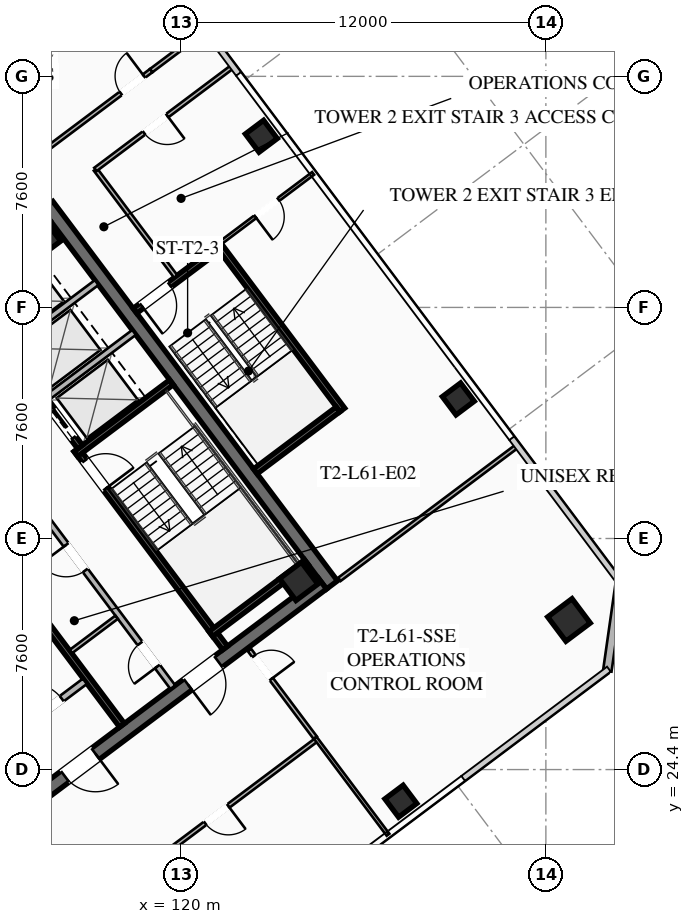
"""IFC4 building model, lengths in metres.
Left out: names, types, materials, properties, quantities, classifications, styles, units other than length and angle.
Written with IfcOpenShell. Run it as: python <this file> out.ifc"""

import sys

from ifc_helpers import new_model, si_unit, direction, frame, frame_2d, origin, origin_2d, place, context, subcontext, project, spatial, rectangle, hollow_rectangle, extrude, element, fill, save


model = new_model("IFC4")
c1 = context("Model", 3, precision=1e-05, world=origin(), true_north=direction((0.0, 1.0)))
c2 = subcontext(c1, "Body", "Model", "MODEL_VIEW")
j1 = project(units=[si_unit("LENGTHUNIT", "METRE"), si_unit("PLANEANGLEUNIT", "RADIAN")], contexts=[c1])
p1 = place(None, origin())
s1 = spatial("IfcSite", under=j1, at=p1, CompositionType="ELEMENT")
p2 = place(p1, origin())
s2 = spatial("IfcBuilding", under=s1, at=p2, CompositionType="ELEMENT")
p3 = place(p2, frame((0.0, 0.0, 225.5)))
s3 = spatial("IfcBuildingStorey", under=s2, at=p3, CompositionType="ELEMENT", Elevation=225.5)
p4 = place(p3, frame((115.604, 42.953, 0.0), z_axis=(0.0, 0.0, 1.0), x_axis=(0.600005007985, -0.799996243986, 0.0)))
e1 = element("IfcWall", 1, at=p4, inside=s3, PredefinedType="SHEAR", context=c2, shape_type="SweptSolid", body=[
    extrude(rectangle(XDim=15.6, YDim=0.45, at=frame_2d((7.8, 0.0))), origin(), (0.0, 0.0, 1.0), 3.55),
])
p5 = place(p3, frame((124.649, 30.518, 0.0), z_axis=(0.0, 0.0, 1.0), x_axis=(-0.8, -0.6, 0.0)))
e2 = element("IfcWall", 2, at=p5, inside=s3, PredefinedType="SHEAR", context=c2, shape_type="SweptSolid", body=[
    extrude(rectangle(XDim=15.26, YDim=0.45, at=frame_2d((7.63, 0.0))), origin(), (0.0, 0.0, 1.0), 3.55),
])
p6 = place(p5, frame((9.33, 0.0, 0.0)))
e3 = element("IfcOpeningElement", 3, at=p6, cuts=e2, PredefinedType="OPENING", context=c2, shape_type="SweptSolid", body=[
    extrude(rectangle(XDim=1.25, YDim=2.25, at=frame_2d((0.625, 1.125))), frame((0.0, 0.235, 0.0), z_axis=(0.0, -1.0, 0.0), x_axis=(1.0, 0.0, 0.0)), (0.0, 0.0, 1.0), 0.47),
])
p7 = place(p5, frame((4.28, 0.0, 0.0)))
e4 = element("IfcOpeningElement", 4, at=p7, cuts=e2, PredefinedType="OPENING", context=c2, shape_type="SweptSolid", body=[
    extrude(rectangle(XDim=1.25, YDim=2.25, at=frame_2d((0.625, 1.125))), frame((0.0, 0.235, 0.0), z_axis=(0.0, -1.0, 0.0), x_axis=(1.0, 0.0, 0.0)), (0.0, 0.0, 1.0), 0.47),
])
for number, where, z_axis, x_axis in (
    (5, (123.87, 30.59, 0.0), (0.0, 0.0, 1.0), (0.8, 0.6, 0.0)),
    (6, (115.41, 41.87, 0.0), (0.0, 0.0, 1.0), (0.8, 0.6, 0.0)),
):
    element("IfcColumn", number, at=place(p3, frame(where, z_axis=z_axis, x_axis=x_axis)), inside=s3, PredefinedType="COLUMN", context=c2, shape_type="SweptSolid", body=[
        extrude(hollow_rectangle(XDim=0.9, YDim=0.9, WallThickness=0.04, at=origin_2d()), origin(), (0.0, 0.0, 1.0), 3.37),
    ])
p8 = place(p3, frame((132.76, 29.32, 0.0), z_axis=(0.0, 0.0, 1.0), x_axis=(0.799999996291, 0.600000004945, 0.0)))
e7 = element("IfcColumn", 7, at=p8, inside=s3, PredefinedType="COLUMN", context=c2, shape_type="SweptSolid", body=[
    extrude(hollow_rectangle(XDim=1.0, YDim=1.0, WallThickness=0.04, at=origin_2d()), origin(), (0.0, 0.0, 1.0), 3.37),
])
for number, where, z_axis, x_axis in (
    (8, (127.23, 23.36, 0.0), (0.0, 0.0, 1.0), (0.8, 0.6, 0.0)),
    (9, (129.12, 36.59, 0.0), (0.0, 0.0, 1.0), (0.8, 0.6, 0.0)),
    (10, (122.64, 45.23, 0.0), (0.0, 0.0, 1.0), (0.8, 0.6, 0.0)),
):
    element("IfcColumn", number, at=place(p3, frame(where, z_axis=z_axis, x_axis=x_axis)), inside=s3, PredefinedType="COLUMN", context=c2, shape_type="SweptSolid", body=[
        extrude(hollow_rectangle(XDim=0.75, YDim=0.75, WallThickness=0.032, at=origin_2d()), origin(), (0.0, 0.0, 1.0), 3.37),
    ])
p9 = place(p3, frame((134.44, 30.58, 0.0), z_axis=(0.0, 0.0, 1.0), x_axis=(-0.14138683146, -0.989954425158, 0.0)))
e11 = element("IfcWall", 11, at=p9, inside=s3, PredefinedType="SOLIDWALL", context=c2, shape_type="SweptSolid", body=[
    extrude(rectangle(XDim=2.97, YDim=0.28, at=frame_2d((1.485, 0.0))), origin(), (0.0, 0.0, 1.0), 3.37),
])
p10 = place(p3, frame((116.56, 34.92, 0.0), z_axis=(0.0, 0.0, 1.0), x_axis=(0.59999041401, -0.800007189403, 0.0)))
e12 = element("IfcWall", 12, at=p10, inside=s3, PredefinedType="SHEAR", context=c2, shape_type="SweptSolid", body=[
    extrude(rectangle(XDim=8.15, YDim=0.2, at=frame_2d((4.075, 0.0))), origin(), (0.0, 0.0, 1.0), 3.37),
])
p11 = place(p10, frame((0.45, 0.0, 0.0)))
e13 = element("IfcOpeningElement", 13, at=p11, cuts=e12, PredefinedType="OPENING", context=c2, shape_type="SweptSolid", body=[
    extrude(rectangle(XDim=1.15, YDim=2.2, at=frame_2d((0.575, 1.1))), frame((0.0, 0.11, 0.0), z_axis=(0.0, -1.0, 0.0), x_axis=(1.0, 0.0, 0.0)), (0.0, 0.0, 1.0), 0.22),
])
for number, where, z_axis, x_axis in (
    (14, (116.54, 34.78, 0.0), (0.0, 0.0, 1.0), (0.8, 0.6, 0.0)),
    (15, (120.98, 28.86, 0.0), (0.0, 0.0, 1.0), (0.8, 0.6, 0.0)),
):
    element("IfcWall", number, at=place(p3, frame(where, z_axis=z_axis, x_axis=x_axis)), inside=s3, PredefinedType="SHEAR", context=c2, shape_type="SweptSolid", body=[
        extrude(rectangle(XDim=3.93, YDim=0.2, at=frame_2d((1.965, 0.0))), origin(), (0.0, 0.0, 1.0), 3.37),
    ])
p12 = place(p3, frame((118.058, 25.856, 0.0), z_axis=(0.0, 0.0, 1.0), x_axis=(-0.600002657301, 0.799998007018, 0.0)))
e16 = element("IfcWall", 16, at=p12, inside=s3, PredefinedType="SHEAR", context=c2, shape_type="SweptSolid", body=[
    extrude(rectangle(XDim=14.7, YDim=0.2, at=frame_2d((7.35, 0.0))), origin(), (0.0, 0.0, 1.0), 3.37),
])
p13 = place(p3, frame((114.316, 25.412, 0.0), z_axis=(0.0, 0.0, 1.0), x_axis=(0.800018601094, 0.59997519774, 0.0)))
e17 = element("IfcWall", 17, at=p13, inside=s3, PredefinedType="SOLIDWALL", context=c2, shape_type="SweptSolid", body=[
    extrude(rectangle(XDim=3.15, YDim=0.22, at=frame_2d((1.575, 0.0))), origin(), (0.0, 0.0, 1.0), 2.723),
])
p14 = place(p13, frame((0.95, 0.0, 0.0)))
e18 = element("IfcOpeningElement", 18, at=p14, cuts=e17, PredefinedType="OPENING", context=c2, shape_type="SweptSolid", body=[
    extrude(rectangle(XDim=1.25, YDim=2.25, at=frame_2d((0.625, 1.125))), frame((0.0, 0.12, 0.0), z_axis=(0.0, -1.0, 0.0), x_axis=(1.0, 0.0, 0.0)), (0.0, 0.0, 1.0), 0.24),
])
p15 = place(p3, frame((112.75, 40.25, 0.0), z_axis=(0.0, 0.0, 1.0), x_axis=(0.599994036198, -0.800004472816, 0.0)))
e19 = element("IfcWall", 19, at=p15, inside=s3, PredefinedType="SHEAR", context=c2, shape_type="SweptSolid", body=[
    extrude(rectangle(XDim=6.55, YDim=0.2, at=frame_2d((3.275, 0.0))), origin(), (0.0, 0.0, 1.0), 3.37),
])
p16 = place(p15, frame((5.075, 0.0, 0.0)))
e20 = element("IfcOpeningElement", 20, at=p16, cuts=e19, PredefinedType="OPENING", context=c2, shape_type="SweptSolid", body=[
    extrude(rectangle(XDim=1.1, YDim=2.2, at=frame_2d((0.55, 1.1))), frame((0.0, 0.11, 0.0), z_axis=(0.0, -1.0, 0.0), x_axis=(1.0, 0.0, 0.0)), (0.0, 0.0, 1.0), 0.22),
])
p17 = place(p15, frame((3.025, 0.0, 0.0)))
e21 = element("IfcOpeningElement", 21, at=p17, cuts=e19, PredefinedType="OPENING", context=c2, shape_type="SweptSolid", body=[
    extrude(rectangle(XDim=1.1, YDim=2.2, at=frame_2d((0.55, 1.1))), frame((0.0, 0.11, 0.0), z_axis=(0.0, -1.0, 0.0), x_axis=(1.0, 0.0, 0.0)), (0.0, 0.0, 1.0), 0.22),
])
p18 = place(p15, frame((1.025, 0.0, 0.0)))
e22 = element("IfcOpeningElement", 22, at=p18, cuts=e19, PredefinedType="OPENING", context=c2, shape_type="SweptSolid", body=[
    extrude(rectangle(XDim=1.1, YDim=2.2, at=frame_2d((0.55, 1.1))), frame((0.0, 0.11, 0.0), z_axis=(0.0, -1.0, 0.0), x_axis=(1.0, 0.0, 0.0)), (0.0, 0.0, 1.0), 0.22),
])
for number, where, z_axis, x_axis in (
    (23, (115.59, 36.63, 0.0), (0.0, 0.0, 1.0), (0.8, 0.6, 0.0)),
    (24, (114.36, 38.27, 0.0), (0.0, 0.0, 1.0), (0.8, 0.6, 0.0)),
):
    element("IfcWall", number, at=place(p3, frame(where, z_axis=z_axis, x_axis=x_axis)), inside=s3, PredefinedType="SOLIDWALL", context=c2, shape_type="SweptSolid", body=[
        extrude(rectangle(XDim=3.58, YDim=0.2, at=frame_2d((1.79, 0.0))), origin(), (0.0, 0.0, 1.0), 3.37),
    ])
p19 = place(p3, frame((119.73, 27.11, 0.0), z_axis=(0.0, 0.0, 1.0), x_axis=(-0.600005580459, 0.799995814625, 0.0)))
e25 = element("IfcWall", 25, at=p19, inside=s3, PredefinedType="SOLIDWALL", context=c2, shape_type="SweptSolid", body=[
    extrude(rectangle(XDim=7.0, YDim=0.2, at=frame_2d((3.5, 0.0))), origin(), (0.0, 0.0, 1.0), 2.723),
])
p20 = place(p19, frame((0.85, 0.0, 0.0)))
e26 = element("IfcOpeningElement", 26, at=p20, cuts=e25, PredefinedType="OPENING", context=c2, shape_type="SweptSolid", body=[
    extrude(rectangle(XDim=0.95, YDim=2.05, at=frame_2d((0.475, 1.025))), frame((0.0, 0.11, 0.0), z_axis=(0.0, -1.0, 0.0), x_axis=(1.0, 0.0, 0.0)), (0.0, 0.0, 1.0), 0.22),
])
p21 = place(p19, frame((4.8, 0.0, 0.0)))
e27 = element("IfcOpeningElement", 27, at=p21, cuts=e25, PredefinedType="OPENING", context=c2, shape_type="SweptSolid", body=[
    extrude(rectangle(XDim=1.05, YDim=2.2, at=frame_2d((0.525, 1.1))), frame((0.0, 0.11, 0.0), z_axis=(0.0, -1.0, 0.0), x_axis=(1.0, 0.0, 0.0)), (0.0, 0.0, 1.0), 0.22),
])
p22 = place(p3, frame((116.376, 28.282, 0.0), z_axis=(0.0, 0.0, 1.0), x_axis=(0.8, 0.6, 0.0)))
e28 = element("IfcWall", 28, at=p22, inside=s3, PredefinedType="PARTITIONING", context=c2, shape_type="SweptSolid", body=[
    extrude(rectangle(XDim=1.88, YDim=0.135, at=frame_2d((0.94, 0.0))), origin(), (0.0, 0.0, 1.0), 2.723),
])
p23 = place(p3, frame((125.304, 36.228, 0.0), z_axis=(0.0, 0.0, 1.0), x_axis=(-0.59998851072, 0.800008616831, 0.0)))
e29 = element("IfcWall", 29, at=p23, inside=s3, PredefinedType="SHEAR", context=c2, shape_type="SweptSolid", body=[
    extrude(rectangle(XDim=6.8, YDim=0.2, at=frame_2d((3.4, 0.0))), origin(), (0.0, 0.0, 1.0), 3.37),
])
p24 = place(p3, frame((121.204, 41.528, 0.0), z_axis=(0.0, 0.0, 1.0), x_axis=(-0.800017232136, -0.599977023131, 0.0)))
e30 = element("IfcWall", 30, at=p24, inside=s3, PredefinedType="SHEAR", context=c2, shape_type="SweptSolid", body=[
    extrude(rectangle(XDim=3.4, YDim=0.2, at=frame_2d((1.7, 0.0))), origin(), (0.0, 0.0, 1.0), 3.37),
])
p25 = place(p24, frame((1.975, 0.0, 0.0)))
e31 = element("IfcOpeningElement", 31, at=p25, cuts=e30, PredefinedType="OPENING", context=c2, shape_type="SweptSolid", body=[
    extrude(rectangle(XDim=1.15, YDim=2.2, at=frame_2d((0.575, 1.1))), frame((0.0, 0.11, 0.0), z_axis=(0.0, -1.0, 0.0), x_axis=(1.0, 0.0, 0.0)), (0.0, 0.0, 1.0), 0.22),
])
p26 = place(p3, frame((122.444, 34.208, 0.0), z_axis=(0.0, 0.0, 1.0), x_axis=(0.79999138319, 0.600011488909, 0.0)))
e32 = element("IfcWall", 32, at=p26, inside=s3, PredefinedType="SHEAR", context=c2, shape_type="SweptSolid", body=[
    extrude(rectangle(XDim=3.4, YDim=0.2, at=frame_2d((1.7, 0.0))), origin(), (0.0, 0.0, 1.0), 3.37),
])
p27 = place(p3, frame((119.824, 40.618, 0.0), z_axis=(0.0, 0.0, 1.0), x_axis=(-0.599982243973, 0.800013316712, 0.0)))
e33 = element("IfcWall", 33, at=p27, inside=s3, PredefinedType="PARTITIONING", context=c2, shape_type="SweptSolid", body=[
    extrude(rectangle(XDim=4.4, YDim=0.135, at=frame_2d((2.2, 0.0))), origin(), (0.0, 0.0, 1.0), 2.723),
])
p28 = place(p3, frame((100.756, 33.692, 0.0), z_axis=(0.0, 0.0, 1.0), x_axis=(0.799998716732, 0.60000171102, 0.0)))
e34 = element("IfcWall", 34, at=p28, inside=s3, PredefinedType="PARTITIONING", context=c2, shape_type="SweptSolid", body=[
    extrude(rectangle(XDim=22.83, YDim=0.135, at=frame_2d((11.415, 0.0))), origin(), (0.0, 0.0, 1.0), 2.723),
])
p29 = place(p28, frame((9.193, 0.0, 0.0)))
e35 = element("IfcOpeningElement", 35, at=p29, cuts=e34, PredefinedType="OPENING", context=c2, shape_type="SweptSolid", body=[
    extrude(rectangle(XDim=0.95, YDim=2.05, at=frame_2d((0.475, 1.025))), frame((0.0, 0.077, 0.0), z_axis=(0.0, -1.0, 0.0), x_axis=(1.0, 0.0, 0.0)), (0.0, 0.0, 1.0), 0.155),
])
p30 = place(p28, frame((21.58, 0.0, 0.0)))
e36 = element("IfcOpeningElement", 36, at=p30, cuts=e34, PredefinedType="OPENING", context=c2, shape_type="SweptSolid", body=[
    extrude(rectangle(XDim=0.95, YDim=2.05, at=frame_2d((0.475, 1.025))), frame((0.0, 0.077, 0.0), z_axis=(0.0, -1.0, 0.0), x_axis=(1.0, 0.0, 0.0)), (0.0, 0.0, 1.0), 0.155),
])
p31 = place(p3, frame((119.02, 47.39, 0.0), z_axis=(0.0, 0.0, 1.0), x_axis=(0.799960585956, 0.600052548463, 0.0)))
e37 = element("IfcWall", 37, at=p31, inside=s3, PredefinedType="PARTITIONING", context=c2, shape_type="SweptSolid", body=[
    extrude(rectangle(XDim=2.23, YDim=0.135, at=frame_2d((1.115, 0.0))), origin(), (0.0, 0.0, 1.0), 2.723),
])
p32 = place(p3, frame((124.462, 25.384, 0.0), z_axis=(0.0, 0.0, 1.0), x_axis=(-0.799997904343, -0.6000027942, 0.0)))
e38 = element("IfcWall", 38, at=p32, inside=s3, PredefinedType="PARTITIONING", context=c2, shape_type="SweptSolid", body=[
    extrude(rectangle(XDim=13.98, YDim=0.135, at=frame_2d((6.99, 0.0))), origin(), (0.0, 0.0, 1.0), 2.723),
])
p33 = place(p32, frame((3.635, 0.0, 0.0)))
e39 = element("IfcOpeningElement", 39, at=p33, cuts=e38, PredefinedType="OPENING", context=c2, shape_type="SweptSolid", body=[
    extrude(rectangle(XDim=0.95, YDim=2.05, at=frame_2d((0.475, 1.025))), frame((0.0, 0.077, 0.0), z_axis=(0.0, -1.0, 0.0), x_axis=(1.0, 0.0, 0.0)), (0.0, 0.0, 1.0), 0.155),
])
p34 = place(p3, frame((122.248, 28.336, 0.0), z_axis=(0.0, 0.0, 1.0), x_axis=(0.600010820699, -0.799991884361, 0.0)))
e40 = element("IfcWall", 40, at=p34, inside=s3, PredefinedType="PARTITIONING", context=c2, shape_type="SweptSolid", body=[
    extrude(rectangle(XDim=3.61, YDim=0.135, at=frame_2d((1.805, 0.0))), origin(), (0.0, 0.0, 1.0), 2.723),
])
p35 = place(p34, frame((0.25, 0.0, 0.0)))
e41 = element("IfcOpeningElement", 41, at=p35, cuts=e40, PredefinedType="OPENING", context=c2, shape_type="SweptSolid", body=[
    extrude(rectangle(XDim=0.95, YDim=2.05, at=frame_2d((0.475, 1.025))), frame((0.0, 0.077, 0.0), z_axis=(0.0, -1.0, 0.0), x_axis=(1.0, 0.0, 0.0)), (0.0, 0.0, 1.0), 0.155),
])
p36 = place(p3, frame((126.808, 22.256, 0.0), z_axis=(0.0, 0.0, 1.0), x_axis=(-0.600019580308, 0.799985314394, 0.0)))
e42 = element("IfcWall", 42, at=p36, inside=s3, PredefinedType="PARTITIONING", context=c2, shape_type="SweptSolid", body=[
    extrude(rectangle(XDim=3.99, YDim=0.11, at=frame_2d((1.995, 0.0))), origin(), (0.0, 0.0, 1.0), 2.723),
])
p37 = place(p3, frame((121.704, 47.528, 0.0), z_axis=(0.0, 0.0, 1.0), x_axis=(-0.799989629485, -0.600013827105, 0.0)))
e43 = element("IfcWall", 43, at=p37, inside=s3, PredefinedType="PARTITIONING", context=c2, shape_type="SweptSolid", body=[
    extrude(rectangle(XDim=5.65, YDim=0.135, at=frame_2d((2.825, 0.0))), origin(), (0.0, 0.0, 1.0), 2.723),
])
p38 = place(p37, frame((2.7, 0.0, 0.0)))
e44 = element("IfcOpeningElement", 44, at=p38, cuts=e43, PredefinedType="OPENING", context=c2, shape_type="SweptSolid", body=[
    extrude(rectangle(XDim=0.95, YDim=2.05, at=frame_2d((0.475, 1.025))), frame((0.0, 0.077, 0.0), z_axis=(0.0, -1.0, 0.0), x_axis=(1.0, 0.0, 0.0)), (0.0, 0.0, 1.0), 0.155),
])
p39 = place(p3, frame((125.208, 30.656, 0.0), z_axis=(0.0, 0.0, 1.0), x_axis=(0.79999199534, 0.600010672732, 0.0)))
e45 = element("IfcWall", 45, at=p39, inside=s3, PredefinedType="PARTITIONING", context=c2, shape_type="SweptSolid", body=[
    extrude(rectangle(XDim=7.32, YDim=0.135, at=frame_2d((3.66, 0.0))), origin(), (0.0, 0.0, 1.0), 2.723),
])
p40 = place(p3, frame((124.344, 44.008, 0.0), z_axis=(0.0, 0.0, 1.0), x_axis=(-0.8, -0.6, 0.0)))
e46 = element("IfcWall", 46, at=p40, inside=s3, PredefinedType="PARTITIONING", context=c2, shape_type="SweptSolid", body=[
    extrude(rectangle(XDim=3.8, YDim=0.11, at=frame_2d((1.9, 0.0))), origin(), (0.0, 0.0, 1.0), 2.723),
])
p41 = place(p40, frame((1.425, 0.0, 0.0)))
e47 = element("IfcOpeningElement", 47, at=p41, cuts=e46, PredefinedType="OPENING", context=c2, shape_type="SweptSolid", body=[
    extrude(rectangle(XDim=0.95, YDim=2.05, at=frame_2d((0.475, 1.025))), frame((0.0, 0.065, 0.0), z_axis=(0.0, -1.0, 0.0), x_axis=(1.0, 0.0, 0.0)), (0.0, 0.0, 1.0), 0.13),
])
p42 = place(p6, origin())
e48 = element("IfcDoor", 48, at=p42, inside=s3, OperationType="SINGLE_SWING_LEFT", PredefinedType="DOOR", context=c2, shape_type="SweptSolid", body=[
    extrude(rectangle(XDim=1.25, YDim=2.25, at=frame_2d((0.625, 1.125))), frame((0.0, 0.025, 0.0), z_axis=(0.0, -1.0, 0.0), x_axis=(1.0, 0.0, 0.0)), (0.0, 0.0, 1.0), 0.05),
])
fill(e3, e48)
p43 = place(p7, origin())
e49 = element("IfcDoor", 49, at=p43, inside=s3, OperationType="SINGLE_SWING_RIGHT", PredefinedType="DOOR", context=c2, shape_type="SweptSolid", body=[
    extrude(rectangle(XDim=1.25, YDim=2.25, at=frame_2d((0.625, 1.125))), frame((0.0, 0.025, 0.0), z_axis=(0.0, -1.0, 0.0), x_axis=(1.0, 0.0, 0.0)), (0.0, 0.0, 1.0), 0.05),
])
fill(e4, e49)
p44 = place(p11, origin())
e50 = element("IfcDoor", 50, at=p44, inside=s3, OperationType="SINGLE_SWING_RIGHT", PredefinedType="DOOR", context=c2, shape_type="SweptSolid", body=[
    extrude(rectangle(XDim=1.15, YDim=2.2, at=frame_2d((0.575, 1.1))), frame((0.0, 0.025, 0.0), z_axis=(0.0, -1.0, 0.0), x_axis=(1.0, 0.0, 0.0)), (0.0, 0.0, 1.0), 0.05),
])
fill(e13, e50)
p45 = place(p14, origin())
e51 = element("IfcDoor", 51, at=p45, inside=s3, OperationType="SINGLE_SWING_LEFT", PredefinedType="DOOR", context=c2, shape_type="SweptSolid", body=[
    extrude(rectangle(XDim=1.25, YDim=2.25, at=frame_2d((0.625, 1.125))), frame((0.0, 0.025, 0.0), z_axis=(0.0, -1.0, 0.0), x_axis=(1.0, 0.0, 0.0)), (0.0, 0.0, 1.0), 0.05),
])
fill(e18, e51)
p46 = place(p20, origin())
e52 = element("IfcDoor", 52, at=p46, inside=s3, OperationType="SINGLE_SWING_LEFT", PredefinedType="DOOR", context=c2, shape_type="SweptSolid", body=[
    extrude(rectangle(XDim=0.95, YDim=2.05, at=frame_2d((0.475, 1.025))), frame((0.0, 0.025, 0.0), z_axis=(0.0, -1.0, 0.0), x_axis=(1.0, 0.0, 0.0)), (0.0, 0.0, 1.0), 0.05),
])
fill(e26, e52)
p47 = place(p21, origin())
e53 = element("IfcDoor", 53, at=p47, inside=s3, OperationType="SINGLE_SWING_RIGHT", PredefinedType="DOOR", context=c2, shape_type="SweptSolid", body=[
    extrude(rectangle(XDim=1.05, YDim=2.2, at=frame_2d((0.525, 1.1))), frame((0.0, 0.025, 0.0), z_axis=(0.0, -1.0, 0.0), x_axis=(1.0, 0.0, 0.0)), (0.0, 0.0, 1.0), 0.05),
])
fill(e27, e53)
p48 = place(p25, origin())
e54 = element("IfcDoor", 54, at=p48, inside=s3, OperationType="SINGLE_SWING_RIGHT", PredefinedType="DOOR", context=c2, shape_type="SweptSolid", body=[
    extrude(rectangle(XDim=1.15, YDim=2.2, at=frame_2d((0.575, 1.1))), frame((0.0, 0.025, 0.0), z_axis=(0.0, -1.0, 0.0), x_axis=(1.0, 0.0, 0.0)), (0.0, 0.0, 1.0), 0.05),
])
fill(e31, e54)
p49 = place(p30, origin())
e55 = element("IfcDoor", 55, at=p49, inside=s3, OperationType="SINGLE_SWING_RIGHT", PredefinedType="DOOR", context=c2, shape_type="SweptSolid", body=[
    extrude(rectangle(XDim=0.95, YDim=2.05, at=frame_2d((0.475, 1.025))), frame((0.0, 0.025, 0.0), z_axis=(0.0, -1.0, 0.0), x_axis=(1.0, 0.0, 0.0)), (0.0, 0.0, 1.0), 0.05),
])
fill(e36, e55)
p50 = place(p33, origin())
e56 = element("IfcDoor", 56, at=p50, inside=s3, OperationType="SINGLE_SWING_LEFT", PredefinedType="DOOR", context=c2, shape_type="SweptSolid", body=[
    extrude(rectangle(XDim=0.95, YDim=2.05, at=frame_2d((0.475, 1.025))), frame((0.0, 0.025, 0.0), z_axis=(0.0, -1.0, 0.0), x_axis=(1.0, 0.0, 0.0)), (0.0, 0.0, 1.0), 0.05),
])
fill(e39, e56)
p51 = place(p35, origin())
e57 = element("IfcDoor", 57, at=p51, inside=s3, OperationType="SINGLE_SWING_RIGHT", PredefinedType="DOOR", context=c2, shape_type="SweptSolid", body=[
    extrude(rectangle(XDim=0.95, YDim=2.05, at=frame_2d((0.475, 1.025))), frame((0.0, 0.025, 0.0), z_axis=(0.0, -1.0, 0.0), x_axis=(1.0, 0.0, 0.0)), (0.0, 0.0, 1.0), 0.05),
])
fill(e41, e57)
p52 = place(p38, origin())
e58 = element("IfcDoor", 58, at=p52, inside=s3, OperationType="SINGLE_SWING_LEFT", PredefinedType="DOOR", context=c2, shape_type="SweptSolid", body=[
    extrude(rectangle(XDim=0.95, YDim=2.05, at=frame_2d((0.475, 1.025))), frame((0.0, 0.025, 0.0), z_axis=(0.0, -1.0, 0.0), x_axis=(1.0, 0.0, 0.0)), (0.0, 0.0, 1.0), 0.05),
])
fill(e44, e58)
p53 = place(p41, origin())
e59 = element("IfcDoor", 59, at=p53, inside=s3, OperationType="SINGLE_SWING_RIGHT", PredefinedType="DOOR", context=c2, shape_type="SweptSolid", body=[
    extrude(rectangle(XDim=0.95, YDim=2.05, at=frame_2d((0.475, 1.025))), frame((0.0, 0.025, 0.0), z_axis=(0.0, -1.0, 0.0), x_axis=(1.0, 0.0, 0.0)), (0.0, 0.0, 1.0), 0.05),
])
fill(e47, e59)
p54 = place(p16, origin())
e60 = element("IfcDoor", 60, at=p54, inside=s3, OperationType="SLIDING_TO_LEFT", PredefinedType="DOOR", context=c2, shape_type="SweptSolid", body=[
    extrude(rectangle(XDim=1.1, YDim=2.2, at=frame_2d((0.55, 1.1))), frame((0.0, 0.025, 0.0), z_axis=(0.0, -1.0, 0.0), x_axis=(1.0, 0.0, 0.0)), (0.0, 0.0, 1.0), 0.05),
])
fill(e20, e60)
save(model, sys.argv[1])
